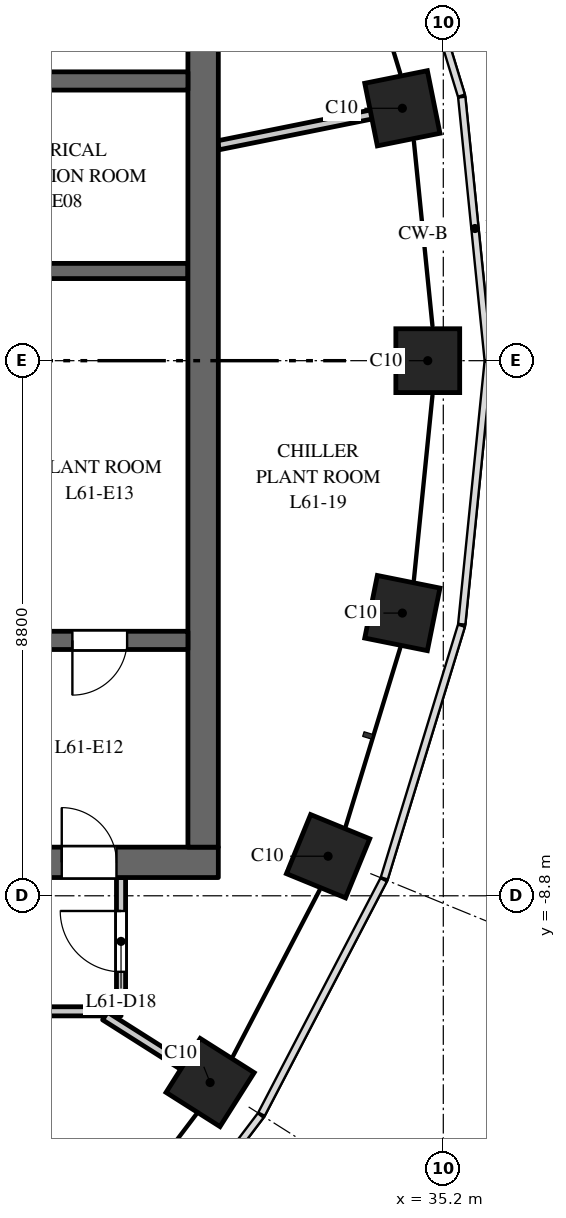
"""IFC4 building model, lengths in metres.
Left out: names, types, materials, properties, quantities, classifications, styles, units other than length and angle.
Written with IfcOpenShell. Run it as: python <this file> out.ifc"""

import sys

from ifc_helpers import new_model, si_unit, direction, frame, frame_2d, origin, origin_2d, place, context, subcontext, project, spatial, rectangle, extrude, element, fill, save


model = new_model("IFC4")
c1 = context("Model", 3, precision=1e-05, world=origin(), true_north=direction((0.0, 1.0)))
c2 = subcontext(c1, "Body", "Model", "MODEL_VIEW")
j1 = project(units=[si_unit("LENGTHUNIT", "METRE"), si_unit("PLANEANGLEUNIT", "RADIAN")], contexts=[c1])
p1 = place(None, origin())
s1 = spatial("IfcSite", under=j1, at=p1, CompositionType="ELEMENT")
p2 = place(p1, origin())
s2 = spatial("IfcBuilding", under=s1, at=p2, CompositionType="ELEMENT")
p3 = place(p2, frame((0.0, 0.0, 285.5)))
s3 = spatial("IfcBuildingStorey", under=s2, at=p3, CompositionType="ELEMENT", Elevation=285.5)
for number, where, z_axis, x_axis in (
    (1, (34.945, 0.0, 0.0), (0.0, 0.0, 1.0), (0.0, 1.0, 0.0)),
    (2, (34.527, 4.151, 0.0), (0.0, 0.0, 1.0), (-0.197, 0.98, 0.0)),
    (3, (31.365, -11.871, 0.0), (0.0, 0.0, 1.0), (0.535, 0.845, 0.0)),
    (4, (33.305, -8.149, 0.0), (0.0, 0.0, 1.0), (0.379, 0.925, 0.0)),
    (5, (34.527, -4.151, 0.0), (0.0, 0.0, 1.0), (0.197, 0.98, 0.0)),
):
    element("IfcColumn", number, at=place(p3, frame(where, z_axis=z_axis, x_axis=x_axis)), inside=s3, PredefinedType="COLUMN", context=c2, shape_type="SweptSolid", body=[
        extrude(rectangle(XDim=1.05, YDim=1.05, at=origin_2d()), origin(), (0.0, 0.0, 1.0), 5.5),
    ])
p4 = place(p3, frame((16.5, -8.25, 0.0), z_axis=(0.0, 0.0, 1.0), x_axis=(1.0, 0.0, 0.0)))
e6 = element("IfcWall", 6, at=p4, inside=s3, PredefinedType="SHEAR", context=c2, shape_type="SweptSolid", body=[
    extrude(rectangle(XDim=15.0, YDim=0.5, at=frame_2d((7.5, 0.0))), origin(), (0.0, 0.0, 1.0), 5.2),
])
p5 = place(p4, frame((6.9, 0.0, 0.0)))
e7 = element("IfcOpeningElement", 7, at=p5, cuts=e6, PredefinedType="OPENING", context=c2, shape_type="SweptSolid", body=[
    extrude(rectangle(XDim=1.2, YDim=2.1, at=frame_2d((0.6, 1.05))), frame((0.0, 0.26, 0.0), z_axis=(0.0, -1.0, 0.0), x_axis=(1.0, 0.0, 0.0)), (0.0, 0.0, 1.0), 0.52),
])
p6 = place(p4, frame((12.425, 0.0, 0.0)))
e8 = element("IfcOpeningElement", 8, at=p6, cuts=e6, PredefinedType="OPENING", context=c2, shape_type="SweptSolid", body=[
    extrude(rectangle(XDim=0.9, YDim=2.1, at=frame_2d((0.45, 1.05))), frame((0.0, 0.26, 0.0), z_axis=(0.0, -1.0, 0.0), x_axis=(1.0, 0.0, 0.0)), (0.0, 0.0, 1.0), 0.52),
])
p7 = place(p3, frame((27.8, 1.475, 0.0), z_axis=(0.0, 0.0, 1.0), x_axis=(1.0, 0.0, 0.0)))
e9 = element("IfcWall", 9, at=p7, inside=s3, PredefinedType="SHEAR", context=c2, shape_type="SweptSolid", body=[
    extrude(rectangle(XDim=3.2, YDim=0.25, at=frame_2d((1.6, 0.0))), origin(), (0.0, 0.0, 1.0), 5.2),
])
p8 = place(p3, frame((31.25, -8.0, 0.0), z_axis=(0.0, 0.0, 1.0), x_axis=(0.0, 1.0, 0.0)))
e10 = element("IfcWall", 10, at=p8, inside=s3, PredefinedType="SHEAR", context=c2, shape_type="SweptSolid", body=[
    extrude(rectangle(XDim=16.0, YDim=0.5, at=frame_2d((8.0, 0.0))), origin(), (0.0, 0.0, 1.0), 5.2),
])
p9 = place(p3, frame((24.9, 4.6, 0.0), z_axis=(0.0, 0.0, 1.0), x_axis=(1.0, 0.0, 0.0)))
e11 = element("IfcWall", 11, at=p9, inside=s3, PredefinedType="SHEAR", context=c2, shape_type="SweptSolid", body=[
    extrude(rectangle(XDim=6.1, YDim=0.3, at=frame_2d((3.05, 0.0))), origin(), (0.0, 0.0, 1.0), 5.2),
])
p10 = place(p3, frame((24.9, -4.6, 0.0), z_axis=(0.0, 0.0, 1.0), x_axis=(1.0, 0.0, 0.0)))
e12 = element("IfcWall", 12, at=p10, inside=s3, PredefinedType="SHEAR", context=c2, shape_type="SweptSolid", body=[
    extrude(rectangle(XDim=6.1, YDim=0.3, at=frame_2d((3.05, 0.0))), origin(), (0.0, 0.0, 1.0), 5.2),
])
p11 = place(p10, frame((4.2, 0.0, 0.0)))
e13 = element("IfcOpeningElement", 13, at=p11, cuts=e12, PredefinedType="OPENING", context=c2, shape_type="SweptSolid", body=[
    extrude(rectangle(XDim=0.9, YDim=2.1, at=frame_2d((0.45, 1.05))), frame((0.0, 0.16, 0.0), z_axis=(0.0, -1.0, 0.0), x_axis=(1.0, 0.0, 0.0)), (0.0, 0.0, 1.0), 0.32),
])
p12 = place(p3, frame((24.0, -10.7, 0.0), z_axis=(0.0, 0.0, 1.0), x_axis=(1.0, 0.0, 0.0)))
e14 = element("IfcWall", 14, at=p12, inside=s3, PredefinedType="PARTITIONING", context=c2, shape_type="SweptSolid", body=[
    extrude(rectangle(XDim=5.9, YDim=0.15, at=frame_2d((2.95, 0.0))), origin(), (0.0, 0.0, 1.0), 5.2),
])
p13 = place(p3, frame((29.637, -10.777, 0.0), z_axis=(0.0, 0.0, 1.0), x_axis=(0.844747041197, -0.535165802709, 0.0)))
e15 = element("IfcWall", 15, at=p13, inside=s3, PredefinedType="PARTITIONING", context=c2, shape_type="SweptSolid", body=[
    extrude(rectangle(XDim=2.145, YDim=0.15, at=frame_2d((1.073, 0.0))), origin(), (0.0, 0.0, 1.0), 5.2),
])
p14 = place(p3, frame((29.9, -10.7, 0.0), z_axis=(0.0, 0.0, 1.0), x_axis=(0.0, 1.0, 0.0)))
e16 = element("IfcWall", 16, at=p14, inside=s3, PredefinedType="PARTITIONING", context=c2, shape_type="SweptSolid", body=[
    extrude(rectangle(XDim=2.2, YDim=0.15, at=frame_2d((1.1, 0.0))), origin(), (0.0, 0.0, 1.0), 5.2),
])
p15 = place(p14, frame((0.65, 0.0, 0.0)))
e17 = element("IfcOpeningElement", 17, at=p15, cuts=e16, PredefinedType="OPENING", context=c2, shape_type="SweptSolid", body=[
    extrude(rectangle(XDim=1.0, YDim=2.1, at=frame_2d((0.5, 1.05))), frame((0.0, 0.085, 0.0), z_axis=(0.0, -1.0, 0.0), x_axis=(1.0, 0.0, 0.0)), (0.0, 0.0, 1.0), 0.17),
])
p16 = place(p3, frame((31.5, 3.542, 0.0), z_axis=(0.0, 0.0, 1.0), x_axis=(0.98034430806, 0.197294291997, 0.0)))
e18 = element("IfcWall", 18, at=p16, inside=s3, PredefinedType="PARTITIONING", context=c2, shape_type="SweptSolid", body=[
    extrude(rectangle(XDim=3.188, YDim=0.15, at=frame_2d((1.594, 0.0))), origin(), (0.0, 0.0, 1.0), 5.2),
])
p17 = place(p6, origin())
e19 = element("IfcDoor", 19, at=p17, inside=s3, OperationType="SINGLE_SWING_RIGHT", PredefinedType="DOOR", context=c2, shape_type="SweptSolid", body=[
    extrude(rectangle(XDim=0.9, YDim=2.1, at=frame_2d((0.45, 1.05))), frame((0.0, 0.025, 0.0), z_axis=(0.0, -1.0, 0.0), x_axis=(1.0, 0.0, 0.0)), (0.0, 0.0, 1.0), 0.05),
])
fill(e8, e19)
p18 = place(p11, origin())
e20 = element("IfcDoor", 20, at=p18, inside=s3, OperationType="SINGLE_SWING_LEFT", PredefinedType="DOOR", context=c2, shape_type="SweptSolid", body=[
    extrude(rectangle(XDim=0.9, YDim=2.1, at=frame_2d((0.45, 1.05))), frame((0.0, 0.025, 0.0), z_axis=(0.0, -1.0, 0.0), x_axis=(1.0, 0.0, 0.0)), (0.0, 0.0, 1.0), 0.05),
])
fill(e13, e20)
p19 = place(p15, origin())
e21 = element("IfcDoor", 21, at=p19, inside=s3, OperationType="SINGLE_SWING_RIGHT", PredefinedType="DOOR", context=c2, shape_type="SweptSolid", body=[
    extrude(rectangle(XDim=1.0, YDim=2.1, at=frame_2d((0.5, 1.05))), frame((0.0, 0.025, 0.0), z_axis=(0.0, -1.0, 0.0), x_axis=(1.0, 0.0, 0.0)), (0.0, 0.0, 1.0), 0.05),
])
fill(e17, e21)
save(model, sys.argv[1])
